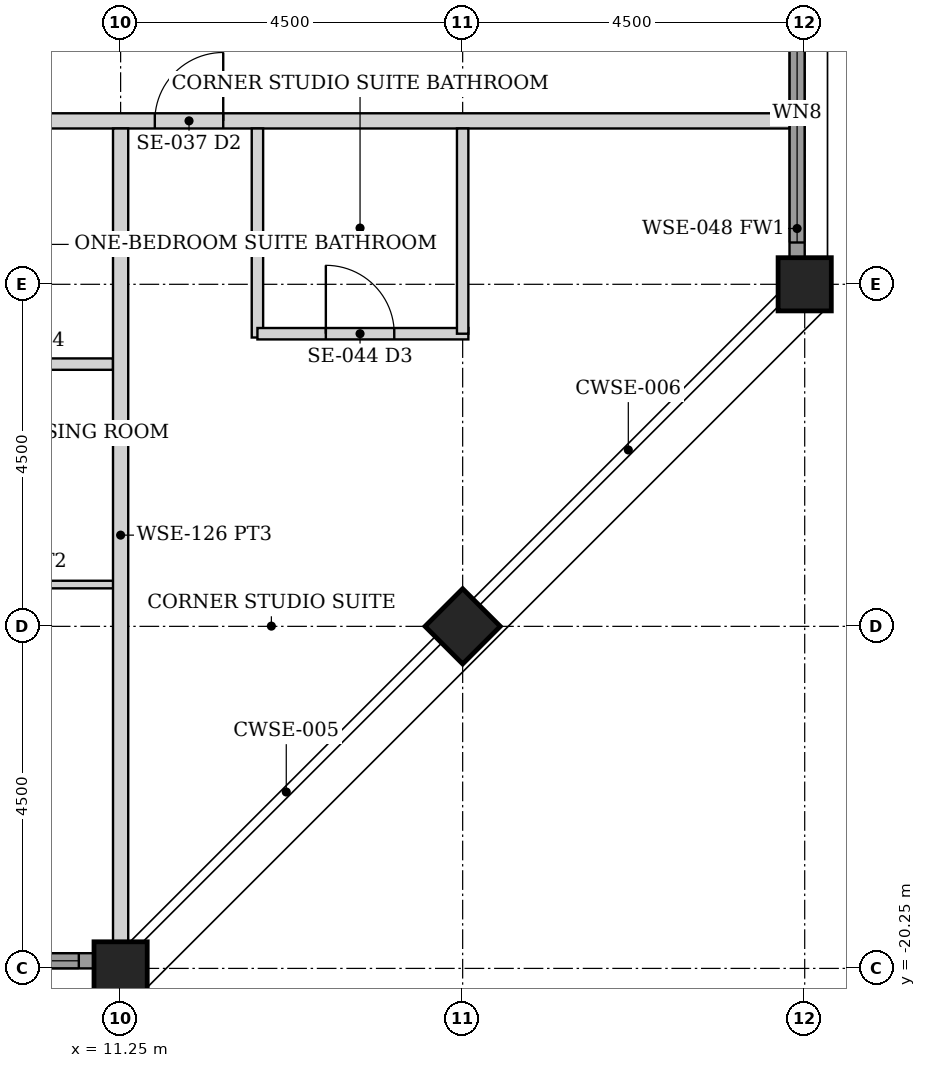
"""IFC4 building model, lengths in metres.
Left out: names, types, materials, properties, quantities, classifications, styles, units other than length and angle.
Written with IfcOpenShell. Run it as: python <this file> out.ifc"""

import sys

from ifc_helpers import new_model, si_unit, direction, frame, frame_2d, origin, origin_2d, place, context, subcontext, project, spatial, rectangle, hollow_rectangle, extrude, element, fill, save


model = new_model("IFC4")
c1 = context("Model", 3, precision=1e-05, world=origin(), true_north=direction((0.0, 1.0)))
c2 = subcontext(c1, "Body", "Model", "MODEL_VIEW")
j1 = project(units=[si_unit("LENGTHUNIT", "METRE"), si_unit("PLANEANGLEUNIT", "RADIAN")], contexts=[c1])
p1 = place(None, origin())
s1 = spatial("IfcSite", under=j1, at=p1, CompositionType="ELEMENT")
p2 = place(p1, origin())
s2 = spatial("IfcBuilding", under=s1, at=p2, CompositionType="ELEMENT")
p3 = place(p2, frame((0.0, 0.0, 253.3)))
s3 = spatial("IfcBuildingStorey", under=s2, at=p3, CompositionType="ELEMENT", Elevation=253.3)
for number, where, z_axis, x_axis in (
    (1, (20.25, -11.25, 0.0), (0.0, 0.0, 1.0), (1.0, 0.0, 0.0)),
    (2, (11.25, -20.25, 0.0), (0.0, 0.0, 1.0), (0.0, 1.0, 0.0)),
    (3, (15.75, -15.75, 0.0), (0.0, 0.0, 1.0), (0.707, -0.707, 0.0)),
):
    element("IfcColumn", number, at=place(p3, frame(where, z_axis=z_axis, x_axis=x_axis)), inside=s3, PredefinedType="COLUMN", context=c2, shape_type="SweptSolid", body=[
        extrude(hollow_rectangle(XDim=0.7, YDim=0.7, WallThickness=0.035, at=origin_2d()), origin(), (0.0, 0.0, 1.0), 3.75),
    ])
p4 = place(p3, frame((7.105, -20.15, 0.0), z_axis=(0.0, 0.0, 1.0), x_axis=(1.0, 0.0, 0.0)))
e4 = element("IfcWall", 4, at=p4, inside=s3, PredefinedType="SOLIDWALL", context=c2, shape_type="SweptSolid", body=[
    extrude(rectangle(XDim=3.79, YDim=0.2, at=frame_2d((1.895, 0.0))), origin(), (0.0, 0.0, 1.0), 2.579),
])
p5 = place(p4, frame((0.195, 0.0, 0.3)))
e5 = element("IfcOpeningElement", 5, at=p5, cuts=e4, PredefinedType="OPENING", context=c2, shape_type="SweptSolid", body=[
    extrude(rectangle(XDim=3.4, YDim=2.129, at=frame_2d((1.7, 1.064))), frame((0.0, 0.11, 0.0), z_axis=(0.0, -1.0, 0.0), x_axis=(1.0, 0.0, 0.0)), (0.0, 0.0, 1.0), 0.22),
])
p6 = place(p3, frame((20.15, -10.895, 0.0), z_axis=(0.0, 0.0, 1.0), x_axis=(0.0, 1.0, 0.0)))
e6 = element("IfcWall", 6, at=p6, inside=s3, PredefinedType="SOLIDWALL", context=c2, shape_type="SweptSolid", body=[
    extrude(rectangle(XDim=3.79, YDim=0.2, at=frame_2d((1.895, 0.0))), origin(), (0.0, 0.0, 1.0), 2.579),
])
p7 = place(p6, frame((0.195, 0.0, 0.3)))
e7 = element("IfcOpeningElement", 7, at=p7, cuts=e6, PredefinedType="OPENING", context=c2, shape_type="SweptSolid", body=[
    extrude(rectangle(XDim=3.4, YDim=2.129, at=frame_2d((1.7, 1.064))), frame((0.0, 0.11, 0.0), z_axis=(0.0, -1.0, 0.0), x_axis=(1.0, 0.0, 0.0)), (0.0, 0.0, 1.0), 0.22),
])
p8 = place(p3, frame((-20.05, -9.1, 0.0), z_axis=(0.0, 0.0, 1.0), x_axis=(1.0, 0.0, 0.0)))
e8 = element("IfcWall", 8, at=p8, inside=s3, PredefinedType="PARTITIONING", context=c2, shape_type="SweptSolid", body=[
    extrude(rectangle(XDim=40.1, YDim=0.2, at=frame_2d((20.05, 0.0))), origin(), (0.0, 0.0, 1.0), 2.573),
])
p9 = place(p8, frame((14.05, 0.0, 0.0)))
e9 = element("IfcOpeningElement", 9, at=p9, cuts=e8, PredefinedType="OPENING", context=c2, shape_type="SweptSolid", body=[
    extrude(rectangle(XDim=0.9, YDim=2.1, at=frame_2d((0.45, 1.05))), frame((0.0, 0.11, 0.0), z_axis=(0.0, -1.0, 0.0), x_axis=(1.0, 0.0, 0.0)), (0.0, 0.0, 1.0), 0.22),
])
p10 = place(p8, frame((23.05, 0.0, 0.0)))
e10 = element("IfcOpeningElement", 10, at=p10, cuts=e8, PredefinedType="OPENING", context=c2, shape_type="SweptSolid", body=[
    extrude(rectangle(XDim=0.9, YDim=2.1, at=frame_2d((0.45, 1.05))), frame((0.0, 0.11, 0.0), z_axis=(0.0, -1.0, 0.0), x_axis=(1.0, 0.0, 0.0)), (0.0, 0.0, 1.0), 0.22),
])
p11 = place(p8, frame((31.75, 0.0, 0.0)))
e11 = element("IfcOpeningElement", 11, at=p11, cuts=e8, PredefinedType="OPENING", context=c2, shape_type="SweptSolid", body=[
    extrude(rectangle(XDim=0.9, YDim=2.1, at=frame_2d((0.45, 1.05))), frame((0.0, 0.11, 0.0), z_axis=(0.0, -1.0, 0.0), x_axis=(1.0, 0.0, 0.0)), (0.0, 0.0, 1.0), 0.22),
])
p12 = place(p8, frame((7.45, 0.0, 0.0)))
e12 = element("IfcOpeningElement", 12, at=p12, cuts=e8, PredefinedType="OPENING", context=c2, shape_type="SweptSolid", body=[
    extrude(rectangle(XDim=0.9, YDim=2.1, at=frame_2d((0.45, 1.05))), frame((0.0, 0.11, 0.0), z_axis=(0.0, -1.0, 0.0), x_axis=(1.0, 0.0, 0.0)), (0.0, 0.0, 1.0), 0.22),
])
p13 = place(p3, frame((8.1, -12.3, 0.0), z_axis=(0.0, 0.0, 1.0), x_axis=(1.0, 0.0, 0.0)))
e13 = element("IfcWall", 13, at=p13, inside=s3, PredefinedType="PARTITIONING", context=c2, shape_type="SweptSolid", body=[
    extrude(rectangle(XDim=3.05, YDim=0.15, at=frame_2d((1.525, 0.0))), origin(), (0.0, 0.0, 1.0), 2.573),
])
p14 = place(p3, frame((8.05, -15.2, 0.0), z_axis=(0.0, 0.0, 1.0), x_axis=(1.0, 0.0, 0.0)))
e14 = element("IfcWall", 14, at=p14, inside=s3, PredefinedType="PARTITIONING", context=c2, shape_type="SweptSolid", body=[
    extrude(rectangle(XDim=3.2, YDim=0.1, at=frame_2d((1.6, 0.0))), origin(), (0.0, 0.0, 1.0), 2.573),
])
p15 = place(p3, frame((11.25, -19.9, 0.0), z_axis=(0.0, 0.0, 1.0), x_axis=(0.0, 1.0, 0.0)))
e15 = element("IfcWall", 15, at=p15, inside=s3, PredefinedType="PARTITIONING", context=c2, shape_type="SweptSolid", body=[
    extrude(rectangle(XDim=10.7, YDim=0.2, at=frame_2d((5.35, 0.0))), origin(), (0.0, 0.0, 1.0), 2.573),
])
p16 = place(p3, frame((13.05, -11.95, 0.0), z_axis=(0.0, 0.0, 1.0), x_axis=(0.0, 1.0, 0.0)))
e16 = element("IfcWall", 16, at=p16, inside=s3, PredefinedType="PARTITIONING", context=c2, shape_type="SweptSolid", body=[
    extrude(rectangle(XDim=2.75, YDim=0.15, at=frame_2d((1.375, 0.0))), origin(), (0.0, 0.0, 1.0), 2.573),
])
p17 = place(p3, frame((13.05, -11.9, 0.0), z_axis=(0.0, 0.0, 1.0), x_axis=(1.0, 0.0, 0.0)))
e17 = element("IfcWall", 17, at=p17, inside=s3, PredefinedType="PARTITIONING", context=c2, shape_type="SweptSolid", body=[
    extrude(rectangle(XDim=2.775, YDim=0.15, at=frame_2d((1.387, 0.0))), origin(), (0.0, 0.0, 1.0), 2.573),
])
p18 = place(p17, frame((0.9, 0.0, 0.0)))
e18 = element("IfcOpeningElement", 18, at=p18, cuts=e17, PredefinedType="OPENING", context=c2, shape_type="SweptSolid", body=[
    extrude(rectangle(XDim=0.9, YDim=2.1, at=frame_2d((0.45, 1.05))), frame((0.0, 0.085, 0.0), z_axis=(0.0, -1.0, 0.0), x_axis=(1.0, 0.0, 0.0)), (0.0, 0.0, 1.0), 0.17),
])
p19 = place(p3, frame((15.75, -11.9, 0.0), z_axis=(0.0, 0.0, 1.0), x_axis=(0.0, 1.0, 0.0)))
e19 = element("IfcWall", 19, at=p19, inside=s3, PredefinedType="PARTITIONING", context=c2, shape_type="SweptSolid", body=[
    extrude(rectangle(XDim=2.7, YDim=0.15, at=frame_2d((1.35, 0.0))), origin(), (0.0, 0.0, 1.0), 2.573),
])
p20 = place(p5, origin())
e20 = element("IfcWindow", 20, at=p20, inside=s3, PartitioningType="SINGLE_PANEL", PredefinedType="WINDOW", context=c2, shape_type="SweptSolid", body=[
    extrude(rectangle(XDim=3.4, YDim=2.129, at=frame_2d((1.7, 1.064))), frame((0.0, 0.03, 0.0), z_axis=(0.0, -1.0, 0.0), x_axis=(1.0, 0.0, 0.0)), (0.0, 0.0, 1.0), 0.06),
])
fill(e5, e20)
p21 = place(p7, origin())
e21 = element("IfcWindow", 21, at=p21, inside=s3, PartitioningType="SINGLE_PANEL", PredefinedType="WINDOW", context=c2, shape_type="SweptSolid", body=[
    extrude(rectangle(XDim=3.4, YDim=2.129, at=frame_2d((1.7, 1.064))), frame((0.0, 0.03, 0.0), z_axis=(0.0, -1.0, 0.0), x_axis=(1.0, 0.0, 0.0)), (0.0, 0.0, 1.0), 0.06),
])
fill(e7, e21)
p22 = place(p11, origin())
e22 = element("IfcDoor", 22, at=p22, inside=s3, OperationType="SINGLE_SWING_RIGHT", PredefinedType="DOOR", context=c2, shape_type="SweptSolid", body=[
    extrude(rectangle(XDim=0.9, YDim=2.1, at=frame_2d((0.45, 1.05))), frame((0.0, 0.025, 0.0), z_axis=(0.0, -1.0, 0.0), x_axis=(1.0, 0.0, 0.0)), (0.0, 0.0, 1.0), 0.05),
])
fill(e11, e22)
p23 = place(p18, origin())
e23 = element("IfcDoor", 23, at=p23, inside=s3, OperationType="SINGLE_SWING_LEFT", PredefinedType="DOOR", context=c2, shape_type="SweptSolid", body=[
    extrude(rectangle(XDim=0.9, YDim=2.1, at=frame_2d((0.45, 1.05))), frame((0.0, 0.025, 0.0), z_axis=(0.0, -1.0, 0.0), x_axis=(1.0, 0.0, 0.0)), (0.0, 0.0, 1.0), 0.05),
])
fill(e18, e23)
save(model, sys.argv[1])
